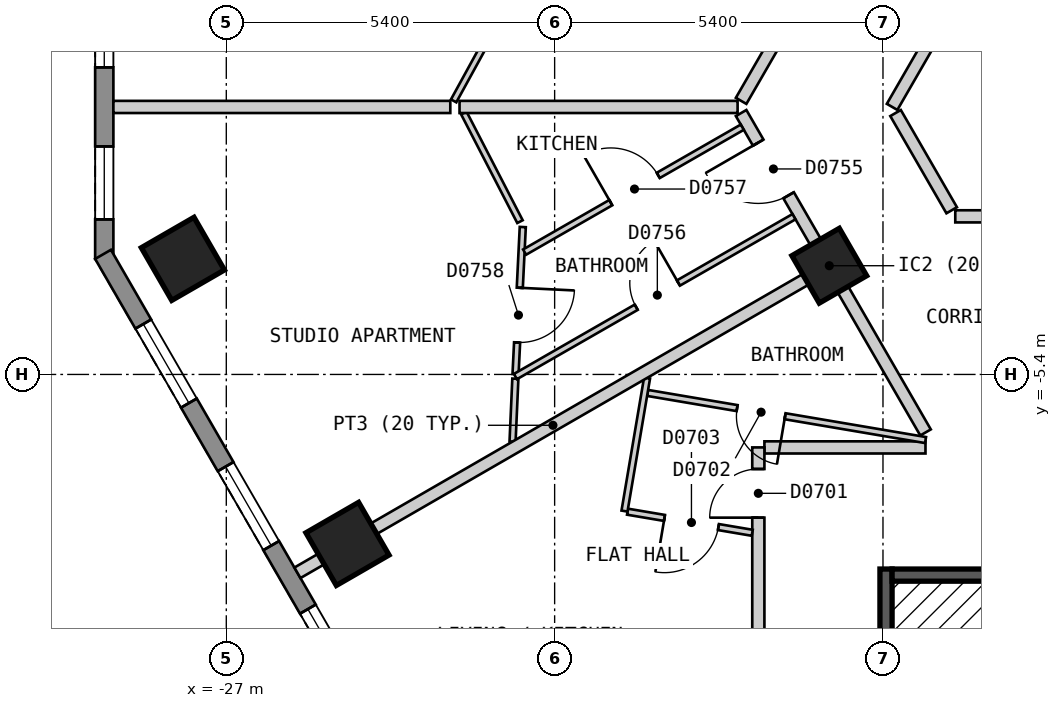
"""IFC4 building model, lengths in metres.
Left out: names, types, materials, properties, quantities, classifications, styles, units other than length and angle.
Written with IfcOpenShell. Run it as: python <this file> out.ifc"""

import sys

from ifc_helpers import new_model, si_unit, direction, frame, frame_2d, origin, origin_2d, place, context, subcontext, project, spatial, polyline, rectangle, outline, extrude, element, fill, save


model = new_model("IFC4")
c1 = context("Model", 3, precision=1e-05, world=origin(), true_north=direction((0.0, 1.0)))
c2 = subcontext(c1, "Body", "Model", "MODEL_VIEW")
j1 = project(units=[si_unit("LENGTHUNIT", "METRE"), si_unit("PLANEANGLEUNIT", "RADIAN")], contexts=[c1])
p1 = place(None, origin())
s1 = spatial("IfcSite", under=j1, at=p1, CompositionType="ELEMENT")
p2 = place(p1, origin())
s2 = spatial("IfcBuilding", under=s1, at=p2, CompositionType="ELEMENT")
p3 = place(p2, frame((0.0, 0.0, 99.0)))
s3 = spatial("IfcBuildingStorey", under=s2, at=p3, CompositionType="ELEMENT", Elevation=99.0)
for number, where, z_axis, x_axis in (
    (1, (-27.714, -3.499, 0.0), (0.0, 0.0, 1.0), (0.5, -0.866, 0.0)),
    (2, (-25.007, -8.187, 0.0), (0.0, 0.0, 1.0), (0.5, -0.866, 0.0)),
):
    element("IfcColumn", number, at=place(p3, frame(where, z_axis=z_axis, x_axis=x_axis)), inside=s3, PredefinedType="COLUMN", context=c2, shape_type="SweptSolid", body=[
        extrude(rectangle(XDim=1.0, YDim=1.0, at=origin_2d()), origin(), (0.0, 0.0, 1.0), 3.0),
    ])
p4 = place(p3, frame((-17.083, -3.612, 0.0), z_axis=(0.0, 0.0, 1.0), x_axis=(0.5, -0.866025403784, 0.0)))
e3 = element("IfcColumn", 3, at=p4, inside=s3, PredefinedType="COLUMN", context=c2, shape_type="SweptSolid", body=[
    extrude(rectangle(XDim=0.9, YDim=0.9, at=origin_2d()), origin(), (0.0, 0.0, 1.0), 3.0),
])
p5 = place(p3, frame((-29.007, 1.5, 0.0), z_axis=(0.0, 0.0, 1.0), x_axis=(0.0, -1.0, 0.0)))
e4 = element("IfcWall", 4, at=p5, inside=s3, PredefinedType="SOLIDWALL", context=c2, shape_type="SweptSolid", body=[
    extrude(outline(polyline([(0.0, -0.15), (5.0, -0.15), (4.92, 0.15), (0.08, 0.15), (0.0, -0.15)])), origin(), (0.0, 0.0, 1.0), 2.7),
])
p6 = place(p5, frame((0.65, 0.0, 0.15)))
e5 = element("IfcOpeningElement", 5, at=p6, cuts=e4, PredefinedType="OPENING", context=c2, shape_type="SweptSolid", body=[
    extrude(rectangle(XDim=1.2, YDim=2.1, at=frame_2d((0.6, 1.05))), frame((0.0, 0.16, 0.0), z_axis=(0.0, -1.0, 0.0), x_axis=(1.0, 0.0, 0.0)), (0.0, 0.0, 1.0), 0.32),
])
p7 = place(p5, frame((3.15, 0.0, 0.15)))
e6 = element("IfcOpeningElement", 6, at=p7, cuts=e4, PredefinedType="OPENING", context=c2, shape_type="SweptSolid", body=[
    extrude(rectangle(XDim=1.2, YDim=2.1, at=frame_2d((0.6, 1.05))), frame((0.0, 0.16, 0.0), z_axis=(0.0, -1.0, 0.0), x_axis=(1.0, 0.0, 0.0)), (0.0, 0.0, 1.0), 0.32),
])
p8 = place(p3, frame((-29.027, -3.425, 0.0), z_axis=(0.0, 0.0, 1.0), x_axis=(0.500035407905, -0.866004960056, 0.0)))
e7 = element("IfcWall", 7, at=p8, inside=s3, PredefinedType="SOLIDWALL", context=c2, shape_type="SweptSolid", body=[
    extrude(outline(polyline([(0.0, -0.15), (23.094, -0.15), (23.014, 0.15), (0.08, 0.15), (0.0, -0.15)])), origin(), (0.0, 0.0, 1.0), 2.7),
])
p9 = place(p8, frame((1.324, 0.0, 0.15)))
e8 = element("IfcOpeningElement", 8, at=p9, cuts=e7, PredefinedType="OPENING", context=c2, shape_type="SweptSolid", body=[
    extrude(rectangle(XDim=1.5, YDim=2.1, at=frame_2d((0.75, 1.05))), frame((0.0, 0.16, 0.0), z_axis=(0.0, -1.0, 0.0), x_axis=(1.0, 0.0, 0.0)), (0.0, 0.0, 1.0), 0.32),
])
p10 = place(p8, frame((4.031, 0.0, 0.15)))
e9 = element("IfcOpeningElement", 9, at=p10, cuts=e7, PredefinedType="OPENING", context=c2, shape_type="SweptSolid", body=[
    extrude(rectangle(XDim=1.5, YDim=2.1, at=frame_2d((0.75, 1.05))), frame((0.0, 0.16, 0.0), z_axis=(0.0, -1.0, 0.0), x_axis=(1.0, 0.0, 0.0)), (0.0, 0.0, 1.0), 0.32),
])
p11 = place(p8, frame((6.737, 0.0, 0.15)))
e10 = element("IfcOpeningElement", 10, at=p11, cuts=e7, PredefinedType="OPENING", context=c2, shape_type="SweptSolid", body=[
    extrude(rectangle(XDim=1.5, YDim=2.1, at=frame_2d((0.75, 1.05))), frame((0.0, 0.16, 0.0), z_axis=(0.0, -1.0, 0.0), x_axis=(1.0, 0.0, 0.0)), (0.0, 0.0, 1.0), 0.32),
])
p12 = place(p8, frame((9.444, 0.0, 0.15)))
e11 = element("IfcOpeningElement", 11, at=p12, cuts=e7, PredefinedType="OPENING", context=c2, shape_type="SweptSolid", body=[
    extrude(rectangle(XDim=1.5, YDim=2.1, at=frame_2d((0.75, 1.05))), frame((0.0, 0.16, 0.0), z_axis=(0.0, -1.0, 0.0), x_axis=(1.0, 0.0, 0.0)), (0.0, 0.0, 1.0), 0.32),
])
p13 = place(p8, frame((12.151, 0.0, 0.15)))
e12 = element("IfcOpeningElement", 12, at=p13, cuts=e7, PredefinedType="OPENING", context=c2, shape_type="SweptSolid", body=[
    extrude(rectangle(XDim=1.5, YDim=2.1, at=frame_2d((0.75, 1.05))), frame((0.0, 0.16, 0.0), z_axis=(0.0, -1.0, 0.0), x_axis=(1.0, 0.0, 0.0)), (0.0, 0.0, 1.0), 0.32),
])
p14 = place(p8, frame((14.857, 0.0, 0.15)))
e13 = element("IfcOpeningElement", 13, at=p14, cuts=e7, PredefinedType="OPENING", context=c2, shape_type="SweptSolid", body=[
    extrude(rectangle(XDim=1.5, YDim=2.1, at=frame_2d((0.75, 1.05))), frame((0.0, 0.16, 0.0), z_axis=(0.0, -1.0, 0.0), x_axis=(1.0, 0.0, 0.0)), (0.0, 0.0, 1.0), 0.32),
])
p15 = place(p8, frame((17.564, 0.0, 0.15)))
e14 = element("IfcOpeningElement", 14, at=p15, cuts=e7, PredefinedType="OPENING", context=c2, shape_type="SweptSolid", body=[
    extrude(rectangle(XDim=1.5, YDim=2.1, at=frame_2d((0.75, 1.05))), frame((0.0, 0.16, 0.0), z_axis=(0.0, -1.0, 0.0), x_axis=(1.0, 0.0, 0.0)), (0.0, 0.0, 1.0), 0.32),
])
p16 = place(p8, frame((20.27, 0.0, 0.15)))
e15 = element("IfcOpeningElement", 15, at=p16, cuts=e7, PredefinedType="OPENING", context=c2, shape_type="SweptSolid", body=[
    extrude(rectangle(XDim=1.5, YDim=2.1, at=frame_2d((0.75, 1.05))), frame((0.0, 0.16, 0.0), z_axis=(0.0, -1.0, 0.0), x_axis=(1.0, 0.0, 0.0)), (0.0, 0.0, 1.0), 0.32),
])
p17 = place(p3, frame((-15.993, -1.101, 0.0), z_axis=(0.0, 0.0, 1.0), x_axis=(0.499894174133, -0.866086493757, 0.0)))
e16 = element("IfcWall", 16, at=p17, inside=s3, PredefinedType="PARTITIONING", context=c2, shape_type="SweptSolid", body=[
    extrude(rectangle(XDim=1.846, YDim=0.2, at=frame_2d((0.923, 0.0))), origin(), (0.0, 0.0, 1.0), 2.7),
])
p18 = place(p3, frame((-18.533, -1.101, 0.0), z_axis=(0.0, 0.0, 1.0), x_axis=(0.500135180047, -0.865947343479, 0.0)))
e17 = element("IfcWall", 17, at=p18, inside=s3, PredefinedType="PARTITIONING", context=c2, shape_type="SweptSolid", body=[
    extrude(rectangle(XDim=2.799, YDim=0.2, at=frame_2d((1.399, 0.0))), origin(), (0.0, 0.0, 1.0), 2.7),
])
p19 = place(p18, frame((0.562, 0.0, 0.0)))
e18 = element("IfcOpeningElement", 18, at=p19, cuts=e17, PredefinedType="OPENING", context=c2, shape_type="SweptSolid", body=[
    extrude(rectangle(XDim=1.0, YDim=2.1, at=frame_2d((0.5, 1.05))), frame((0.0, 0.11, 0.0), z_axis=(0.0, -1.0, 0.0), x_axis=(1.0, 0.0, 0.0)), (0.0, 0.0, 1.0), 0.22),
])
p20 = place(p3, frame((-16.855, -4.008, 0.0), z_axis=(0.0, 0.0, 1.0), x_axis=(0.500151474942, -0.865937932021, 0.0)))
e19 = element("IfcWall", 19, at=p20, inside=s3, PredefinedType="PARTITIONING", context=c2, shape_type="SweptSolid", body=[
    extrude(rectangle(XDim=2.709, YDim=0.2, at=frame_2d((1.354, 0.0))), origin(), (0.0, 0.0, 1.0), 2.7),
])
p21 = place(p3, frame((-18.15, -6.6, 0.0), z_axis=(0.0, 0.0, 1.0), x_axis=(1.0, 0.0, 0.0)))
e20 = element("IfcWall", 20, at=p21, inside=s3, PredefinedType="PARTITIONING", context=c2, shape_type="SweptSolid", body=[
    extrude(rectangle(XDim=2.649, YDim=0.2, at=frame_2d((1.324, 0.0))), origin(), (0.0, 0.0, 1.0), 2.7),
])
p22 = place(p3, frame((-15.011, -2.8, 0.0), z_axis=(0.0, 0.0, 1.0), x_axis=(1.0, 0.0, 0.0)))
e21 = element("IfcWall", 21, at=p22, inside=s3, PredefinedType="PARTITIONING", context=c2, shape_type="SweptSolid", body=[
    extrude(rectangle(XDim=7.982, YDim=0.2, at=frame_2d((3.991, 0.0))), origin(), (0.0, 0.0, 1.0), 2.7),
])
p23 = place(p3, frame((-16.05, -1.0, 0.0), z_axis=(0.0, 0.0, 1.0), x_axis=(0.499962449088, 0.866047082728, 0.0)))
e22 = element("IfcWall", 22, at=p23, inside=s3, PredefinedType="PARTITIONING", context=c2, shape_type="SweptSolid", body=[
    extrude(rectangle(XDim=10.391, YDim=0.2, at=frame_2d((5.195, 0.0))), origin(), (0.0, 0.0, 1.0), 2.7),
])
p24 = place(p23, frame((4.745, 0.0, 0.0)))
e23 = element("IfcOpeningElement", 23, at=p24, cuts=e22, PredefinedType="OPENING", context=c2, shape_type="SweptSolid", body=[
    extrude(rectangle(XDim=0.9, YDim=2.1, at=frame_2d((0.45, 1.05))), frame((0.0, 0.11, 0.0), z_axis=(0.0, -1.0, 0.0), x_axis=(1.0, 0.0, 0.0)), (0.0, 0.0, 1.0), 0.22),
])
p25 = place(p3, frame((-18.533, -0.901, 0.0), z_axis=(0.0, 0.0, 1.0), x_axis=(0.499981198768, 0.866036258409, 0.0)))
e24 = element("IfcWall", 24, at=p25, inside=s3, PredefinedType="PARTITIONING", context=c2, shape_type="SweptSolid", body=[
    extrude(rectangle(XDim=20.093, YDim=0.2, at=frame_2d((10.046, 0.0))), origin(), (0.0, 0.0, 1.0), 2.7),
])
p26 = place(p25, frame((14.57, 0.0, 0.0)))
e25 = element("IfcOpeningElement", 25, at=p26, cuts=e24, PredefinedType="OPENING", context=c2, shape_type="SweptSolid", body=[
    extrude(rectangle(XDim=1.0, YDim=2.1, at=frame_2d((0.5, 1.05))), frame((0.0, 0.11, 0.0), z_axis=(0.0, -1.0, 0.0), x_axis=(1.0, 0.0, 0.0)), (0.0, 0.0, 1.0), 0.22),
])
p27 = place(p25, frame((4.523, 0.0, 0.0)))
e26 = element("IfcOpeningElement", 26, at=p27, cuts=e24, PredefinedType="OPENING", context=c2, shape_type="SweptSolid", body=[
    extrude(rectangle(XDim=1.0, YDim=2.1, at=frame_2d((0.5, 1.05))), frame((0.0, 0.11, 0.0), z_axis=(0.0, -1.0, 0.0), x_axis=(1.0, 0.0, 0.0)), (0.0, 0.0, 1.0), 0.22),
])
p28 = place(p3, frame((-18.25, -10.479, 0.0), z_axis=(0.0, 0.0, 1.0), x_axis=(0.0, 1.0, 0.0)))
e27 = element("IfcWall", 27, at=p28, inside=s3, PredefinedType="PARTITIONING", context=c2, shape_type="SweptSolid", body=[
    extrude(rectangle(XDim=3.879, YDim=0.2, at=frame_2d((1.939, 0.0))), origin(), (0.0, 0.0, 1.0), 2.7),
])
p29 = place(p28, frame((2.724, 0.0, 0.0)))
e28 = element("IfcOpeningElement", 28, at=p29, cuts=e27, PredefinedType="OPENING", context=c2, shape_type="SweptSolid", body=[
    extrude(rectangle(XDim=0.8, YDim=2.1, at=frame_2d((0.4, 1.05))), frame((0.0, 0.11, 0.0), z_axis=(0.0, -1.0, 0.0), x_axis=(1.0, 0.0, 0.0)), (0.0, 0.0, 1.0), 0.22),
])
p30 = place(p3, frame((-23.093, -1.101, 0.0), z_axis=(0.0, 0.0, 1.0), x_axis=(0.459171814268, -0.888347479865, 0.0)))
e29 = element("IfcWall", 29, at=p30, inside=s3, PredefinedType="PARTITIONING", context=c2, shape_type="SweptSolid", body=[
    extrude(rectangle(XDim=2.01, YDim=0.1, at=frame_2d((1.005, 0.0))), origin(), (0.0, 0.0, 1.0), 2.7),
])
p31 = place(p3, frame((-20.071, -5.704, 0.0), z_axis=(0.0, 0.0, 1.0), x_axis=(0.985933263306, -0.16713946364, 0.0)))
e30 = element("IfcWall", 30, at=p31, inside=s3, PredefinedType="PARTITIONING", context=c2, shape_type="SweptSolid", body=[
    extrude(rectangle(XDim=4.636, YDim=0.1, at=frame_2d((2.318, 0.0))), origin(), (0.0, 0.0, 1.0), 2.7),
])
p32 = place(p31, frame((1.493, 0.0, 0.0)))
e31 = element("IfcOpeningElement", 31, at=p32, cuts=e30, PredefinedType="OPENING", context=c2, shape_type="SweptSolid", body=[
    extrude(rectangle(XDim=0.8, YDim=2.1, at=frame_2d((0.4, 1.05))), frame((0.0, 0.06, 0.0), z_axis=(0.0, -1.0, 0.0), x_axis=(1.0, 0.0, 0.0)), (0.0, 0.0, 1.0), 0.12),
])
p33 = place(p3, frame((-20.401, -7.657, 0.0), z_axis=(0.0, 0.0, 1.0), x_axis=(0.985991281902, -0.166796858522, 0.0)))
e32 = element("IfcWall", 32, at=p33, inside=s3, PredefinedType="PARTITIONING", context=c2, shape_type="SweptSolid", body=[
    extrude(rectangle(XDim=2.08, YDim=0.1, at=frame_2d((1.04, 0.0))), origin(), (0.0, 0.0, 1.0), 2.7),
])
p34 = place(p33, frame((0.616, 0.0, 0.0)))
e33 = element("IfcOpeningElement", 33, at=p34, cuts=e32, PredefinedType="OPENING", context=c2, shape_type="SweptSolid", body=[
    extrude(rectangle(XDim=0.9, YDim=2.1, at=frame_2d((0.45, 1.05))), frame((0.0, 0.06, 0.0), z_axis=(0.0, -1.0, 0.0), x_axis=(1.0, 0.0, 0.0)), (0.0, 0.0, 1.0), 0.12),
])
p35 = place(p3, frame((-23.261, -0.901, 0.0), z_axis=(0.0, 0.0, 1.0), x_axis=(0.481037050261, 0.876700265927, 0.0)))
e34 = element("IfcWall", 34, at=p35, inside=s3, PredefinedType="PARTITIONING", context=c2, shape_type="SweptSolid", body=[
    extrude(rectangle(XDim=4.827, YDim=0.1, at=frame_2d((2.414, 0.0))), origin(), (0.0, 0.0, 1.0), 2.7),
])
p36 = place(p3, frame((-20.451, -7.647, 0.0), z_axis=(0.0, 0.0, 1.0), x_axis=(0.167037570483, 0.985950531237, 0.0)))
e35 = element("IfcWall", 35, at=p36, inside=s3, PredefinedType="PARTITIONING", context=c2, shape_type="SweptSolid", body=[
    extrude(rectangle(XDim=2.22, YDim=0.1, at=frame_2d((1.11, 0.0))), origin(), (0.0, 0.0, 1.0), 2.7),
])
p37 = place(p3, frame((-22.243, -5.395, 0.0), z_axis=(0.0, 0.0, 1.0), x_axis=(0.049092933256, 0.998794214993, 0.0)))
e36 = element("IfcWall", 36, at=p37, inside=s3, PredefinedType="PARTITIONING", context=c2, shape_type="SweptSolid", body=[
    extrude(rectangle(XDim=2.422, YDim=0.1, at=frame_2d((1.211, 0.0))), origin(), (0.0, 0.0, 1.0), 2.7),
])
p38 = place(p37, frame((0.522, 0.0, 0.0)))
e37 = element("IfcOpeningElement", 37, at=p38, cuts=e36, PredefinedType="OPENING", context=c2, shape_type="SweptSolid", body=[
    extrude(rectangle(XDim=0.9, YDim=2.1, at=frame_2d((0.45, 1.05))), frame((0.0, 0.06, 0.0), z_axis=(0.0, -1.0, 0.0), x_axis=(1.0, 0.0, 0.0)), (0.0, 0.0, 1.0), 0.12),
])
p39 = place(p3, frame((-22.292, -6.504, 0.0), z_axis=(0.0, 0.0, 1.0), x_axis=(0.04434829575, 0.999016130332, 0.0)))
e38 = element("IfcWall", 38, at=p39, inside=s3, PredefinedType="PARTITIONING", context=c2, shape_type="SweptSolid", body=[
    extrude(rectangle(XDim=1.035, YDim=0.1, at=frame_2d((0.518, 0.0))), origin(), (0.0, 0.0, 1.0), 2.7),
])
p40 = place(p3, frame((-22.245, -5.435, 0.0), z_axis=(0.0, 0.0, 1.0), x_axis=(0.867311485465, 0.497765795511, 0.0)))
e39 = element("IfcWall", 39, at=p40, inside=s3, PredefinedType="PARTITIONING", context=c2, shape_type="SweptSolid", body=[
    extrude(rectangle(XDim=5.282, YDim=0.1, at=frame_2d((2.641, 0.0))), origin(), (0.0, 0.0, 1.0), 2.7),
])
p41 = place(p40, frame((2.291, 0.0, 0.0)))
e40 = element("IfcOpeningElement", 40, at=p41, cuts=e39, PredefinedType="OPENING", context=c2, shape_type="SweptSolid", body=[
    extrude(rectangle(XDim=0.8, YDim=2.1, at=frame_2d((0.4, 1.05))), frame((0.0, 0.06, 0.0), z_axis=(0.0, -1.0, 0.0), x_axis=(1.0, 0.0, 0.0)), (0.0, 0.0, 1.0), 0.12),
])
p42 = place(p3, frame((-22.094, -3.388, 0.0), z_axis=(0.0, 0.0, 1.0), x_axis=(0.867386440944, 0.497635169644, 0.0)))
e41 = element("IfcWall", 41, at=p42, inside=s3, PredefinedType="PARTITIONING", context=c2, shape_type="SweptSolid", body=[
    extrude(rectangle(XDim=4.127, YDim=0.1, at=frame_2d((2.064, 0.0))), origin(), (0.0, 0.0, 1.0), 2.7),
])
p43 = place(p42, frame((1.634, 0.0, 0.0)))
e42 = element("IfcOpeningElement", 42, at=p43, cuts=e41, PredefinedType="OPENING", context=c2, shape_type="SweptSolid", body=[
    extrude(rectangle(XDim=0.9, YDim=2.1, at=frame_2d((0.45, 1.05))), frame((0.0, 0.06, 0.0), z_axis=(0.0, -1.0, 0.0), x_axis=(1.0, 0.0, 0.0)), (0.0, 0.0, 1.0), 0.12),
])
p44 = place(p3, frame((-17.224, -3.844, 0.0), z_axis=(0.0, 0.0, 1.0), x_axis=(0.986049492372, -0.166452391373, 0.0)))
e43 = element("IfcWall", 43, at=p44, inside=s3, PredefinedType="PARTITIONING", context=c2, shape_type="SweptSolid", body=[
    extrude(rectangle(XDim=0.27, YDim=0.2, at=frame_2d((0.135, 0.0))), origin(), (0.0, 0.0, 1.0), 2.7),
])
p45 = place(p3, frame((-28.857, -1.001, 0.0), z_axis=(0.0, 0.0, 1.0), x_axis=(1.0, 0.0, 0.0)))
e44 = element("IfcWall", 44, at=p45, inside=s3, PredefinedType="PARTITIONING", context=c2, shape_type="SweptSolid", body=[
    extrude(rectangle(XDim=5.541, YDim=0.2, at=frame_2d((2.771, 0.0))), origin(), (0.0, 0.0, 1.0), 2.7),
])
p46 = place(p3, frame((-23.164, -1.001, 0.0), z_axis=(0.0, 0.0, 1.0), x_axis=(1.0, 0.0, 0.0)))
e45 = element("IfcWall", 45, at=p46, inside=s3, PredefinedType="PARTITIONING", context=c2, shape_type="SweptSolid", body=[
    extrude(rectangle(XDim=4.573, YDim=0.2, at=frame_2d((2.287, 0.0))), origin(), (0.0, 0.0, 1.0), 2.7),
])
p47 = place(p3, frame((-25.83, -8.662, 0.0), z_axis=(0.0, 0.0, 1.0), x_axis=(0.866026801646, 0.499997578825, 0.0)))
e46 = element("IfcWall", 46, at=p47, inside=s3, PredefinedType="PARTITIONING", context=c2, shape_type="SweptSolid", body=[
    extrude(rectangle(XDim=9.704, YDim=0.2, at=frame_2d((4.852, 0.0))), origin(), (0.0, 0.0, 1.0), 2.7),
])
p48 = place(p3, frame((-17.385, -3.786, 0.0), z_axis=(0.0, 0.0, 1.0), x_axis=(0.86668269741, 0.498859801958, 0.0)))
e47 = element("IfcWall", 47, at=p48, inside=s3, PredefinedType="PARTITIONING", context=c2, shape_type="SweptSolid", body=[
    extrude(rectangle(XDim=0.319, YDim=0.2, at=frame_2d((0.159, 0.0))), origin(), (0.0, 0.0, 1.0), 2.7),
])
p49 = place(p3, frame((-16.15, -14.4, 0.0), z_axis=(0.0, 0.0, 1.0), x_axis=(0.0, 1.0, 0.0)))
e48 = element("IfcWall", 48, at=p49, inside=s3, PredefinedType="SOLIDWALL", context=c2, shape_type="SweptSolid", body=[
    extrude(rectangle(XDim=5.8, YDim=0.2, at=frame_2d((2.9, 0.0))), origin(), (0.0, 0.0, 1.0), 2.7),
])
p50 = place(p3, frame((-16.05, -8.7, 0.0), z_axis=(0.0, 0.0, 1.0), x_axis=(1.0, 0.0, 0.0)))
e49 = element("IfcWall", 49, at=p50, inside=s3, PredefinedType="SOLIDWALL", context=c2, shape_type="SweptSolid", body=[
    extrude(rectangle(XDim=2.75, YDim=0.2, at=frame_2d((1.375, 0.0))), origin(), (0.0, 0.0, 1.0), 2.7),
])
p51 = place(p6, origin())
e50 = element("IfcWindow", 50, at=p51, inside=s3, PartitioningType="SINGLE_PANEL", PredefinedType="WINDOW", context=c2, shape_type="SweptSolid", body=[
    extrude(rectangle(XDim=1.2, YDim=2.1, at=frame_2d((0.6, 1.05))), frame((0.0, 0.03, 0.0), z_axis=(0.0, -1.0, 0.0), x_axis=(1.0, 0.0, 0.0)), (0.0, 0.0, 1.0), 0.06),
])
fill(e5, e50)
p52 = place(p7, origin())
e51 = element("IfcWindow", 51, at=p52, inside=s3, PartitioningType="SINGLE_PANEL", PredefinedType="WINDOW", context=c2, shape_type="SweptSolid", body=[
    extrude(rectangle(XDim=1.2, YDim=2.1, at=frame_2d((0.6, 1.05))), frame((0.0, 0.03, 0.0), z_axis=(0.0, -1.0, 0.0), x_axis=(1.0, 0.0, 0.0)), (0.0, 0.0, 1.0), 0.06),
])
fill(e6, e51)
p53 = place(p9, origin())
e52 = element("IfcWindow", 52, at=p53, inside=s3, PartitioningType="SINGLE_PANEL", PredefinedType="WINDOW", context=c2, shape_type="SweptSolid", body=[
    extrude(rectangle(XDim=1.5, YDim=2.1, at=frame_2d((0.75, 1.05))), frame((0.0, 0.03, 0.0), z_axis=(0.0, -1.0, 0.0), x_axis=(1.0, 0.0, 0.0)), (0.0, 0.0, 1.0), 0.06),
])
fill(e8, e52)
p54 = place(p10, origin())
e53 = element("IfcWindow", 53, at=p54, inside=s3, PartitioningType="SINGLE_PANEL", PredefinedType="WINDOW", context=c2, shape_type="SweptSolid", body=[
    extrude(rectangle(XDim=1.5, YDim=2.1, at=frame_2d((0.75, 1.05))), frame((0.0, 0.03, 0.0), z_axis=(0.0, -1.0, 0.0), x_axis=(1.0, 0.0, 0.0)), (0.0, 0.0, 1.0), 0.06),
])
fill(e9, e53)
p55 = place(p11, origin())
e54 = element("IfcWindow", 54, at=p55, inside=s3, PartitioningType="SINGLE_PANEL", PredefinedType="WINDOW", context=c2, shape_type="SweptSolid", body=[
    extrude(rectangle(XDim=1.5, YDim=2.1, at=frame_2d((0.75, 1.05))), frame((0.0, 0.03, 0.0), z_axis=(0.0, -1.0, 0.0), x_axis=(1.0, 0.0, 0.0)), (0.0, 0.0, 1.0), 0.06),
])
fill(e10, e54)
p56 = place(p29, origin())
e55 = element("IfcDoor", 55, at=p56, inside=s3, OperationType="SINGLE_SWING_LEFT", PredefinedType="DOOR", context=c2, shape_type="SweptSolid", body=[
    extrude(rectangle(XDim=0.8, YDim=2.1, at=frame_2d((0.4, 1.05))), frame((0.0, 0.025, 0.0), z_axis=(0.0, -1.0, 0.0), x_axis=(1.0, 0.0, 0.0)), (0.0, 0.0, 1.0), 0.05),
])
fill(e28, e55)
p57 = place(p32, origin())
e56 = element("IfcDoor", 56, at=p57, inside=s3, OperationType="SINGLE_SWING_RIGHT", PredefinedType="DOOR", context=c2, shape_type="SweptSolid", body=[
    extrude(rectangle(XDim=0.8, YDim=2.1, at=frame_2d((0.4, 1.05))), frame((0.0, 0.025, 0.0), z_axis=(0.0, -1.0, 0.0), x_axis=(1.0, 0.0, 0.0)), (0.0, 0.0, 1.0), 0.05),
])
fill(e31, e56)
p58 = place(p34, origin())
e57 = element("IfcDoor", 57, at=p58, inside=s3, OperationType="SINGLE_SWING_LEFT", PredefinedType="DOOR", context=c2, shape_type="SweptSolid", body=[
    extrude(rectangle(XDim=0.9, YDim=2.1, at=frame_2d((0.45, 1.05))), frame((0.0, 0.025, 0.0), z_axis=(0.0, -1.0, 0.0), x_axis=(1.0, 0.0, 0.0)), (0.0, 0.0, 1.0), 0.05),
])
fill(e33, e57)
p59 = place(p19, origin())
e58 = element("IfcDoor", 58, at=p59, inside=s3, OperationType="SINGLE_SWING_LEFT", PredefinedType="DOOR", context=c2, shape_type="SweptSolid", body=[
    extrude(rectangle(XDim=1.0, YDim=2.1, at=frame_2d((0.5, 1.05))), frame((0.0, 0.025, 0.0), z_axis=(0.0, -1.0, 0.0), x_axis=(1.0, 0.0, 0.0)), (0.0, 0.0, 1.0), 0.05),
])
fill(e18, e58)
p60 = place(p41, origin())
e59 = element("IfcDoor", 59, at=p60, inside=s3, OperationType="SINGLE_SWING_RIGHT", PredefinedType="DOOR", context=c2, shape_type="SweptSolid", body=[
    extrude(rectangle(XDim=0.8, YDim=2.1, at=frame_2d((0.4, 1.05))), frame((0.0, 0.025, 0.0), z_axis=(0.0, -1.0, 0.0), x_axis=(1.0, 0.0, 0.0)), (0.0, 0.0, 1.0), 0.05),
])
fill(e40, e59)
p61 = place(p43, origin())
e60 = element("IfcDoor", 60, at=p61, inside=s3, OperationType="SINGLE_SWING_LEFT", PredefinedType="DOOR", context=c2, shape_type="SweptSolid", body=[
    extrude(rectangle(XDim=0.9, YDim=2.1, at=frame_2d((0.45, 1.05))), frame((0.0, 0.025, 0.0), z_axis=(0.0, -1.0, 0.0), x_axis=(1.0, 0.0, 0.0)), (0.0, 0.0, 1.0), 0.05),
])
fill(e42, e60)
p62 = place(p38, origin())
e61 = element("IfcDoor", 61, at=p62, inside=s3, OperationType="SINGLE_SWING_RIGHT", PredefinedType="DOOR", context=c2, shape_type="SweptSolid", body=[
    extrude(rectangle(XDim=0.9, YDim=2.1, at=frame_2d((0.45, 1.05))), frame((0.0, 0.025, 0.0), z_axis=(0.0, -1.0, 0.0), x_axis=(1.0, 0.0, 0.0)), (0.0, 0.0, 1.0), 0.05),
])
fill(e37, e61)
save(model, sys.argv[1])
